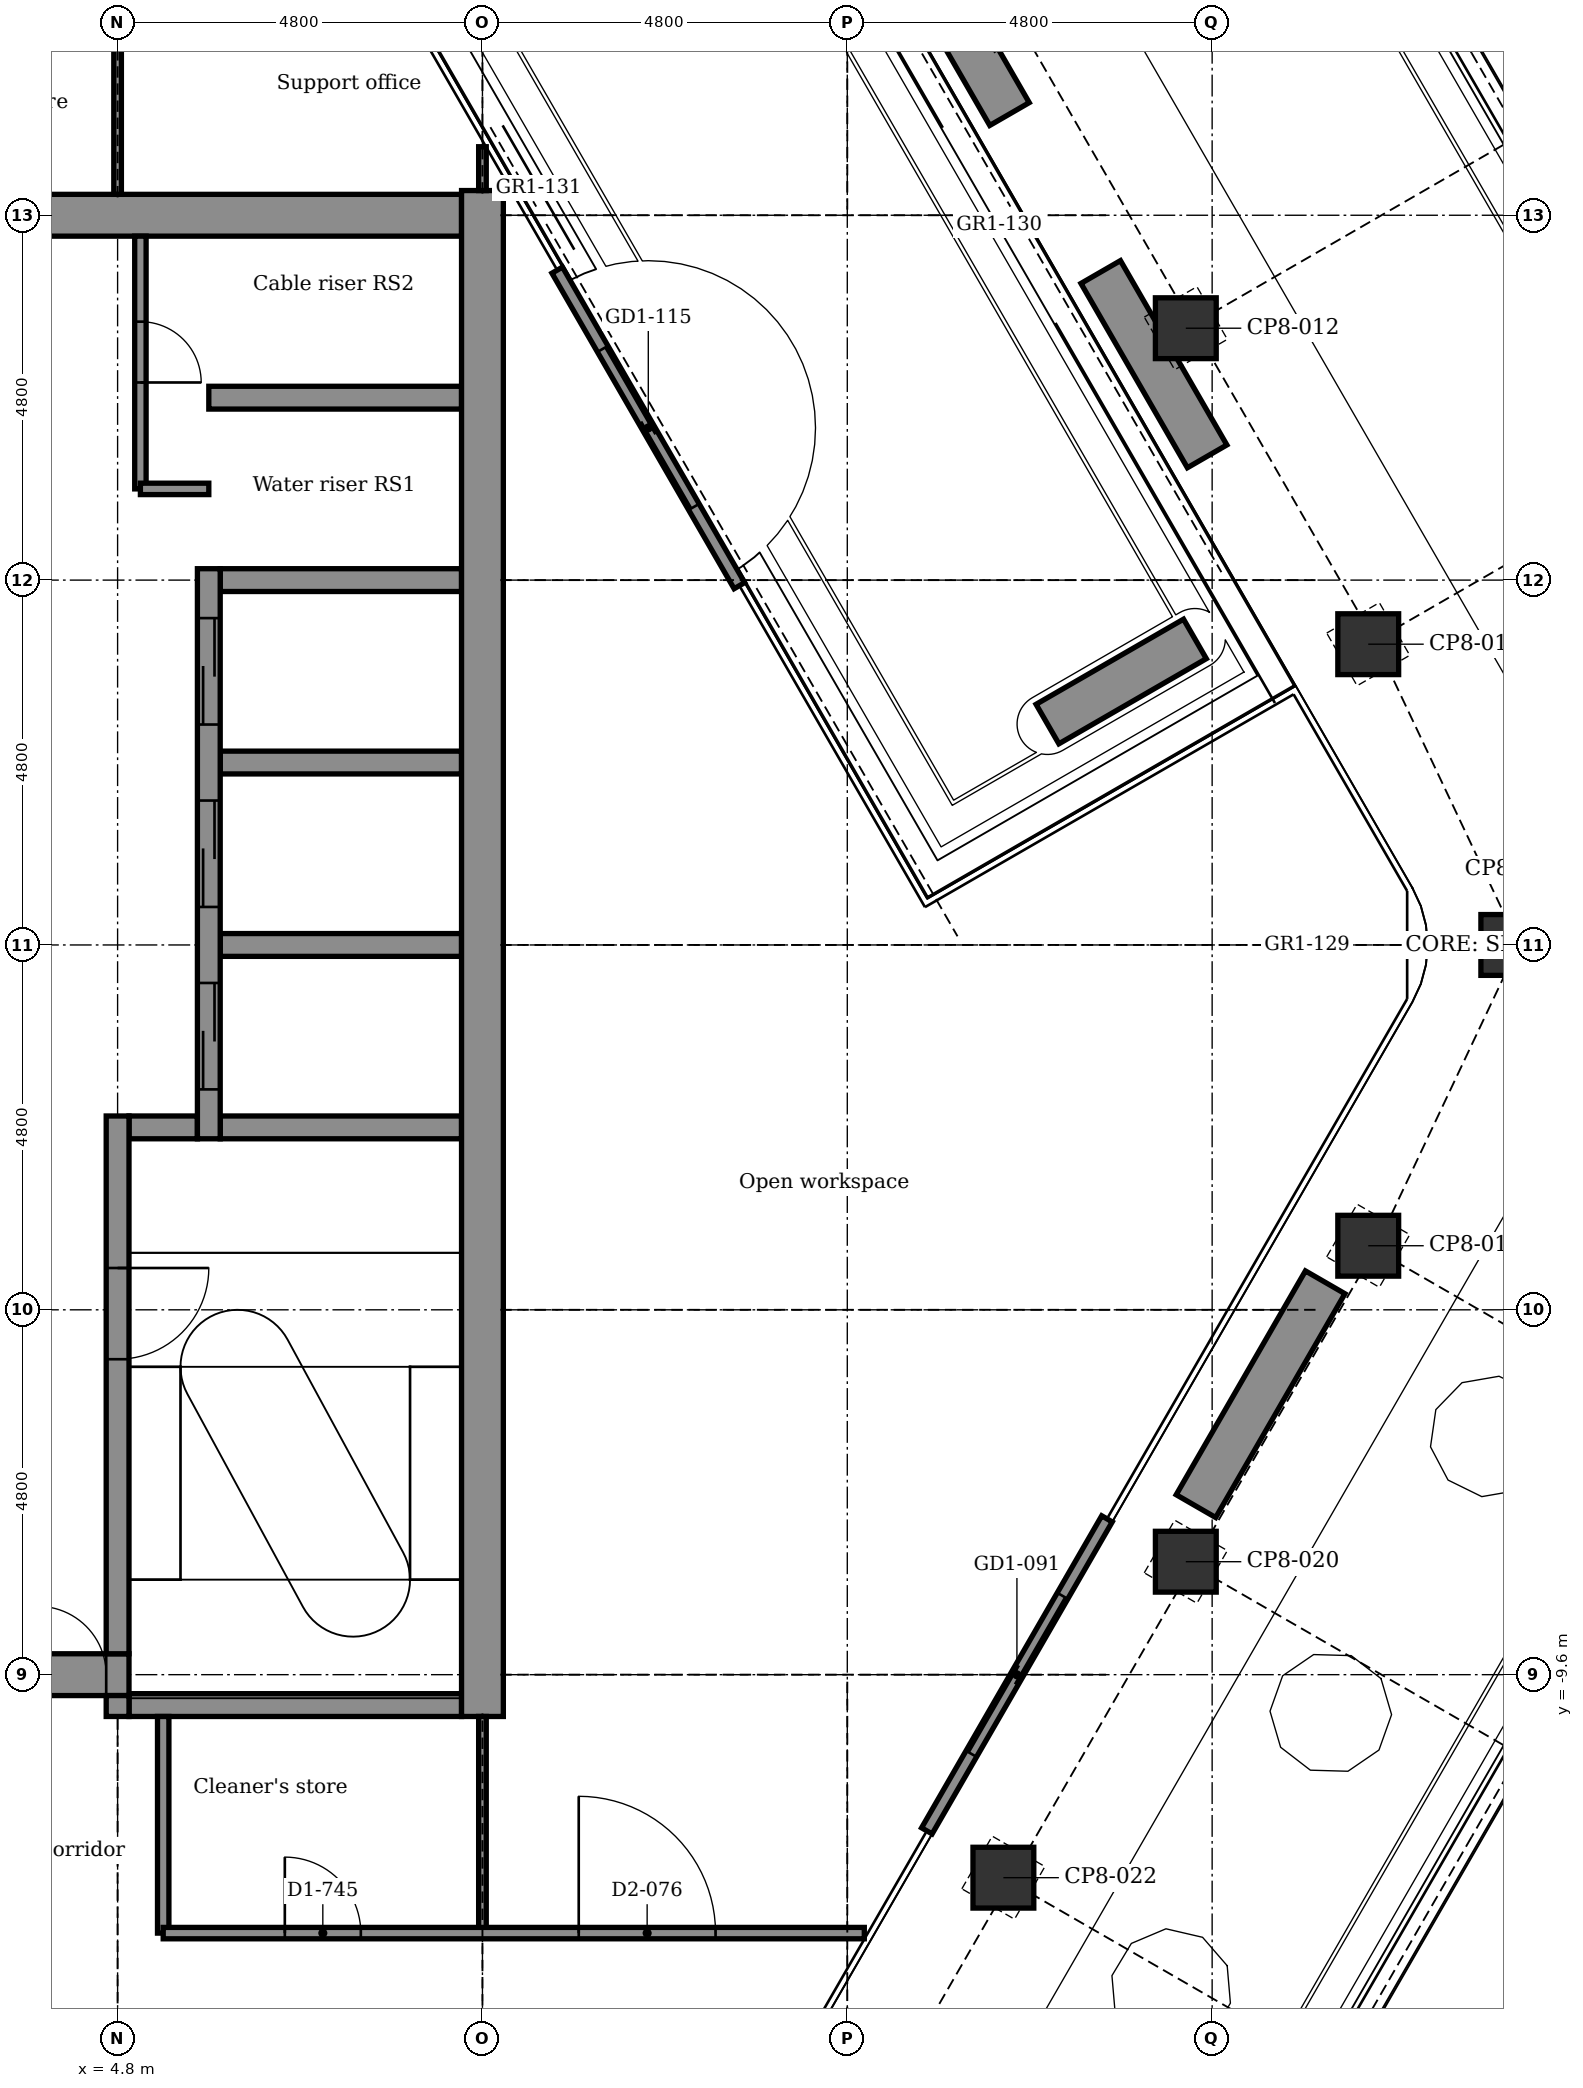
"""IFC4 building model, lengths in metres.
Left out: names, types, materials, properties, quantities, classifications, styles, units other than length and angle.
Written with IfcOpenShell. Run it as: python <this file> out.ifc"""

import sys

from ifc_helpers import new_model, si_unit, direction, frame, frame_2d, origin, origin_2d, place, context, subcontext, project, spatial, rectangle, extrude, element, fill, save


model = new_model("IFC4")
c1 = context("Model", 3, precision=1e-05, world=origin(), true_north=direction((0.0, 1.0)))
c2 = subcontext(c1, "Body", "Model", "MODEL_VIEW")
j1 = project(units=[si_unit("LENGTHUNIT", "METRE"), si_unit("PLANEANGLEUNIT", "RADIAN")], contexts=[c1])
p1 = place(None, origin())
s1 = spatial("IfcSite", under=j1, at=p1, CompositionType="ELEMENT")
p2 = place(p1, origin())
s2 = spatial("IfcBuilding", under=s1, at=p2, CompositionType="ELEMENT")
p3 = place(p2, frame((0.0, 0.0, 285.2)))
s3 = spatial("IfcBuildingStorey", under=s2, at=p3, CompositionType="ELEMENT", Elevation=285.2)
for number, where, z_axis, x_axis in (
    (1, (16.454, 12.271, -0.15), (0.0, 0.0, 1.0), (0.866, 0.5, 0.0)),
    (2, (18.854, 8.114, -0.15), (0.0, 0.0, 1.0), (0.866, 0.5, 0.0)),
    (3, (21.254, 3.957, -0.15), (0.0, 0.0, 1.0), (0.866, 0.5, 0.0)),
    (4, (23.136, 0.0, -0.15), (0.0, 0.0, 1.0), (1.0, 0.0, 0.0)),
    (5, (21.254, -3.957, -0.15), (0.0, 0.0, 1.0), (0.5, 0.866, 0.0)),
    (6, (18.854, -8.114, -0.15), (0.0, 0.0, 1.0), (0.5, 0.866, 0.0)),
    (7, (16.454, -12.271, -0.15), (0.0, 0.0, 1.0), (0.5, 0.866, 0.0)),
):
    element("IfcColumn", number, at=place(p3, frame(where, z_axis=z_axis, x_axis=x_axis)), inside=s3, PredefinedType="COLUMN", context=c2, shape_type="SweptSolid", body=[
        extrude(rectangle(XDim=0.8, YDim=0.8, at=origin_2d()), origin(), (0.0, 0.0, 1.0), 3.9),
    ])
p4 = place(p3, frame((4.95, -10.0, -0.15), z_axis=(0.0, 0.0, 1.0), x_axis=(1.0, 0.0, 0.0)))
e8 = element("IfcWall", 8, at=p4, inside=s3, PredefinedType="STANDARD", context=c2, shape_type="SweptSolid", body=[
    extrude(rectangle(XDim=4.375, YDim=0.3, at=frame_2d((2.188, 0.0))), origin(), (0.0, 0.0, 1.0), 3.9),
])
p5 = place(p3, frame((-5.25, -9.6, -0.15), z_axis=(0.0, 0.0, 1.0), x_axis=(1.0, 0.0, 0.0)))
e9 = element("IfcWall", 9, at=p5, inside=s3, PredefinedType="SHEAR", context=c2, shape_type="SweptSolid", body=[
    extrude(rectangle(XDim=10.2, YDim=0.55, at=frame_2d((5.1, 0.0))), origin(), (0.0, 0.0, 1.0), 3.9),
])
p6 = place(p5, frame((9.0, 0.0, 0.15)))
e10 = element("IfcOpeningElement", 10, at=p6, cuts=e9, PredefinedType="OPENING", context=c2, shape_type="SweptSolid", body=[
    extrude(rectangle(XDim=0.9, YDim=2.1, at=frame_2d((0.45, 1.05))), frame((0.0, 0.285, 0.0), z_axis=(0.0, -1.0, 0.0), x_axis=(1.0, 0.0, 0.0)), (0.0, 0.0, 1.0), 0.57),
])
p7 = place(p3, frame((4.95, -2.4, -0.15), z_axis=(0.0, 0.0, 1.0), x_axis=(1.0, 0.0, 0.0)))
e11 = element("IfcWall", 11, at=p7, inside=s3, PredefinedType="STANDARD", context=c2, shape_type="SweptSolid", body=[
    extrude(rectangle(XDim=0.9, YDim=0.3, at=frame_2d((0.45, 0.0))), origin(), (0.0, 0.0, 1.0), 3.9),
])
for number, where, z_axis, x_axis in (
    (12, (6.15, -2.4, -0.15), (0.0, 0.0, 1.0), (1.0, 0.0, 0.0)),
    (13, (6.15, 0.0, -0.15), (0.0, 0.0, 1.0), (1.0, 0.0, 0.0)),
    (14, (6.15, 2.4, -0.15), (0.0, 0.0, 1.0), (1.0, 0.0, 0.0)),
    (15, (6.15, 4.8, -0.15), (0.0, 0.0, 1.0), (1.0, 0.0, 0.0)),
):
    element("IfcWall", number, at=place(p3, frame(where, z_axis=z_axis, x_axis=x_axis)), inside=s3, PredefinedType="STANDARD", context=c2, shape_type="SweptSolid", body=[
        extrude(rectangle(XDim=3.175, YDim=0.3, at=frame_2d((1.587, 0.0))), origin(), (0.0, 0.0, 1.0), 3.9),
    ])
p8 = place(p3, frame((6.0, 7.2, -0.15), z_axis=(0.0, 0.0, 1.0), x_axis=(1.0, 0.0, 0.0)))
e16 = element("IfcWall", 16, at=p8, inside=s3, PredefinedType="STANDARD", context=c2, shape_type="SweptSolid", body=[
    extrude(rectangle(XDim=3.325, YDim=0.3, at=frame_2d((1.663, 0.0))), origin(), (0.0, 0.0, 1.0), 3.9),
])
p9 = place(p3, frame((-5.25, 9.6, -0.15), z_axis=(0.0, 0.0, 1.0), x_axis=(1.0, 0.0, 0.0)))
e17 = element("IfcWall", 17, at=p9, inside=s3, PredefinedType="SHEAR", context=c2, shape_type="SweptSolid", body=[
    extrude(rectangle(XDim=14.575, YDim=0.55, at=frame_2d((7.288, 0.0))), origin(), (0.0, 0.0, 1.0), 3.9),
])
p10 = place(p9, frame((0.6, 0.0, 0.15)))
e18 = element("IfcOpeningElement", 18, at=p10, cuts=e17, PredefinedType="OPENING", context=c2, shape_type="SweptSolid", body=[
    extrude(rectangle(XDim=0.9, YDim=2.1, at=frame_2d((0.45, 1.05))), frame((0.0, 0.285, 0.0), z_axis=(0.0, -1.0, 0.0), x_axis=(1.0, 0.0, 0.0)), (0.0, 0.0, 1.0), 0.57),
])
p11 = place(p3, frame((4.8, -10.15, -0.15), z_axis=(0.0, 0.0, 1.0), x_axis=(0.0, 1.0, 0.0)))
e19 = element("IfcWall", 19, at=p11, inside=s3, PredefinedType="STANDARD", context=c2, shape_type="SweptSolid", body=[
    extrude(rectangle(XDim=0.275, YDim=0.3, at=frame_2d((0.137, 0.0))), origin(), (0.0, 0.0, 1.0), 3.9),
])
p12 = place(p3, frame((4.8, -9.325, -0.15), z_axis=(0.0, 0.0, 1.0), x_axis=(0.0, 1.0, 0.0)))
e20 = element("IfcWall", 20, at=p12, inside=s3, PredefinedType="STANDARD", context=c2, shape_type="SweptSolid", body=[
    extrude(rectangle(XDim=7.075, YDim=0.3, at=frame_2d((3.538, 0.0))), origin(), (0.0, 0.0, 1.0), 3.9),
])
p13 = place(p12, frame((3.875, 0.0, 0.15)))
e21 = element("IfcOpeningElement", 21, at=p13, cuts=e20, PredefinedType="OPENING", context=c2, shape_type="SweptSolid", body=[
    extrude(rectangle(XDim=1.2, YDim=2.1, at=frame_2d((0.6, 1.05))), frame((0.0, 0.16, 0.0), z_axis=(0.0, -1.0, 0.0), x_axis=(1.0, 0.0, 0.0)), (0.0, 0.0, 1.0), 0.32),
])
p14 = place(p3, frame((6.0, -2.55, -0.15), z_axis=(0.0, 0.0, 1.0), x_axis=(0.0, 1.0, 0.0)))
e22 = element("IfcWall", 22, at=p14, inside=s3, PredefinedType="STANDARD", context=c2, shape_type="SweptSolid", body=[
    extrude(rectangle(XDim=7.5, YDim=0.3, at=frame_2d((3.75, 0.0))), origin(), (0.0, 0.0, 1.0), 3.9),
])
p15 = place(p14, frame((0.65, 0.0, 0.15)))
e23 = element("IfcOpeningElement", 23, at=p15, cuts=e22, PredefinedType="OPENING", context=c2, shape_type="SweptSolid", body=[
    extrude(rectangle(XDim=1.4, YDim=2.1, at=frame_2d((0.7, 1.05))), frame((0.0, 0.16, 0.0), z_axis=(0.0, -1.0, 0.0), x_axis=(1.0, 0.0, 0.0)), (0.0, 0.0, 1.0), 0.32),
])
p16 = place(p14, frame((3.05, 0.0, 0.15)))
e24 = element("IfcOpeningElement", 24, at=p16, cuts=e22, PredefinedType="OPENING", context=c2, shape_type="SweptSolid", body=[
    extrude(rectangle(XDim=1.4, YDim=2.1, at=frame_2d((0.7, 1.05))), frame((0.0, 0.16, 0.0), z_axis=(0.0, -1.0, 0.0), x_axis=(1.0, 0.0, 0.0)), (0.0, 0.0, 1.0), 0.32),
])
p17 = place(p14, frame((5.45, 0.0, 0.15)))
e25 = element("IfcOpeningElement", 25, at=p17, cuts=e22, PredefinedType="OPENING", context=c2, shape_type="SweptSolid", body=[
    extrude(rectangle(XDim=1.4, YDim=2.1, at=frame_2d((0.7, 1.05))), frame((0.0, 0.16, 0.0), z_axis=(0.0, -1.0, 0.0), x_axis=(1.0, 0.0, 0.0)), (0.0, 0.0, 1.0), 0.32),
])
p18 = place(p3, frame((9.6, -10.15, -0.15), z_axis=(0.0, 0.0, 1.0), x_axis=(0.0, 1.0, 0.0)))
e26 = element("IfcWall", 26, at=p18, inside=s3, PredefinedType="SHEAR", context=c2, shape_type="SweptSolid", body=[
    extrude(rectangle(XDim=20.075, YDim=0.55, at=frame_2d((10.038, 0.0))), origin(), (0.0, 0.0, 1.0), 3.9),
])
p19 = place(p3, frame((10.583, 8.878, 0.0), z_axis=(0.0, 0.0, 1.0), x_axis=(0.500011970786, -0.866018492338, 0.0)))
e27 = element("IfcWall", 27, at=p19, inside=s3, PredefinedType="PARTITIONING", context=c2, shape_type="SweptSolid", body=[
    extrude(rectangle(XDim=4.793, YDim=0.16, at=frame_2d((2.397, 0.0))), origin(), (0.0, 0.0, 1.0), 3.75),
])
p20 = place(p19, frame((1.197, 0.0, 0.0)))
e28 = element("IfcOpeningElement", 28, at=p20, cuts=e27, PredefinedType="OPENING", context=c2, shape_type="SweptSolid", body=[
    extrude(rectangle(XDim=2.4, YDim=2.4, at=frame_2d((1.2, 1.2))), frame((0.0, 0.09, 0.0), z_axis=(0.0, -1.0, 0.0), x_axis=(1.0, 0.0, 0.0)), (0.0, 0.0, 1.0), 0.18),
])
p21 = place(p3, frame((17.817, -7.55, 0.0), z_axis=(0.0, 0.0, 1.0), x_axis=(-0.499978080042, -0.866038058908, 0.0)))
e29 = element("IfcWall", 29, at=p21, inside=s3, PredefinedType="PARTITIONING", context=c2, shape_type="SweptSolid", body=[
    extrude(rectangle(XDim=4.74, YDim=0.16, at=frame_2d((2.37, 0.0))), origin(), (0.0, 0.0, 1.0), 3.75),
])
p22 = place(p21, frame((1.17, 0.0, 0.0)))
e30 = element("IfcOpeningElement", 30, at=p22, cuts=e29, PredefinedType="OPENING", context=c2, shape_type="SweptSolid", body=[
    extrude(rectangle(XDim=2.4, YDim=2.4, at=frame_2d((1.2, 1.2))), frame((0.0, 0.09, 0.0), z_axis=(0.0, -1.0, 0.0), x_axis=(1.0, 0.0, 0.0)), (0.0, 0.0, 1.0), 0.18),
])
p23 = place(p3, frame((20.687, -4.438, 0.0), z_axis=(0.0, 0.0, 1.0), x_axis=(-0.500008388397, -0.866020560687, 0.0)))
e31 = element("IfcWall", 31, at=p23, inside=s3, PredefinedType="USERDEFINED", context=c2, shape_type="SweptSolid", body=[
    extrude(rectangle(XDim=3.4, YDim=0.6, at=frame_2d((1.7, 0.0))), origin(), (0.0, 0.0, 1.0), 0.7),
])
p24 = place(p3, frame((17.034, 2.906, 0.0), z_axis=(0.0, 0.0, 1.0), x_axis=(0.866027664105, 0.49999608499, 0.0)))
e32 = element("IfcWall", 32, at=p24, inside=s3, PredefinedType="USERDEFINED", context=c2, shape_type="SweptSolid", body=[
    extrude(rectangle(XDim=2.24, YDim=0.6, at=frame_2d((1.12, 0.0))), origin(), (0.0, 0.0, 1.0), 0.7),
])
p25 = place(p3, frame((16.534, 10.932, 0.0), z_axis=(0.0, 0.0, 1.0), x_axis=(-0.49998411664, 0.866034573852, 0.0)))
e33 = element("IfcWall", 33, at=p25, inside=s3, PredefinedType="USERDEFINED", context=c2, shape_type="SweptSolid", body=[
    extrude(rectangle(XDim=2.8, YDim=0.6, at=frame_2d((1.4, 0.0))), origin(), (0.0, 0.0, 1.0), 0.7),
])
p26 = place(p3, frame((17.734, 8.853, 0.0), z_axis=(0.0, 0.0, 1.0), x_axis=(0.500049511043, -0.865996816683, 0.0)))
e34 = element("IfcWall", 34, at=p26, inside=s3, PredefinedType="USERDEFINED", context=c2, shape_type="SweptSolid", body=[
    extrude(rectangle(XDim=2.8, YDim=0.6, at=frame_2d((1.4, 0.0))), origin(), (0.0, 0.0, 1.0), 0.7),
])
p27 = place(p3, frame((9.6, -13.0, 0.0), z_axis=(0.0, 0.0, 1.0), x_axis=(0.0, 1.0, 0.0)))
e35 = element("IfcWall", 35, at=p27, inside=s3, PredefinedType="PARTITIONING", context=c2, shape_type="SweptSolid", body=[
    extrude(rectangle(XDim=2.85, YDim=0.1, at=frame_2d((1.425, 0.0))), origin(), (0.0, 0.0, 1.0), 3.293),
])
p28 = place(p3, frame((9.6, 9.925, 0.0), z_axis=(0.0, 0.0, 1.0), x_axis=(0.0, 1.0, 0.0)))
e36 = element("IfcWall", 36, at=p28, inside=s3, PredefinedType="PARTITIONING", context=c2, shape_type="SweptSolid", body=[
    extrude(rectangle(XDim=0.576, YDim=0.1, at=frame_2d((0.288, 0.0))), origin(), (0.0, 0.0, 1.0), 3.217),
])
p29 = place(p3, frame((5.4, -13.0, 0.0), z_axis=(0.0, 0.0, 1.0), x_axis=(0.0, 1.0, 0.0)))
e37 = element("IfcWall", 37, at=p29, inside=s3, PredefinedType="PARTITIONING", context=c2, shape_type="SweptSolid", body=[
    extrude(rectangle(XDim=2.85, YDim=0.15, at=frame_2d((1.425, 0.0))), origin(), (0.0, 0.0, 1.0), 3.75),
])
p30 = place(p3, frame((5.1, 6.0, 0.0), z_axis=(0.0, 0.0, 1.0), x_axis=(0.0, 1.0, 0.0)))
e38 = element("IfcWall", 38, at=p30, inside=s3, PredefinedType="PARTITIONING", context=c2, shape_type="SweptSolid", body=[
    extrude(rectangle(XDim=3.325, YDim=0.15, at=frame_2d((1.663, 0.0))), origin(), (0.0, 0.0, 1.0), 3.75),
])
p31 = place(p30, frame((1.4, 0.0, 0.0)))
e39 = element("IfcOpeningElement", 39, at=p31, cuts=e38, PredefinedType="OPENING", context=c2, shape_type="SweptSolid", body=[
    extrude(rectangle(XDim=0.8, YDim=2.1, at=frame_2d((0.4, 1.05))), frame((0.0, 0.085, 0.0), z_axis=(0.0, -1.0, 0.0), x_axis=(1.0, 0.0, 0.0)), (0.0, 0.0, 1.0), 0.17),
])
p32 = place(p3, frame((4.8, 9.875, 0.0), z_axis=(0.0, 0.0, 1.0), x_axis=(0.0, 1.0, 0.0)))
e40 = element("IfcWall", 40, at=p32, inside=s3, PredefinedType="PARTITIONING", context=c2, shape_type="SweptSolid", body=[
    extrude(rectangle(XDim=3.125, YDim=0.1, at=frame_2d((1.562, 0.0))), origin(), (0.0, 0.0, 1.0), 3.217),
])
p33 = place(p3, frame((5.4, -13.0, 0.0), z_axis=(0.0, 0.0, 1.0), x_axis=(1.0, 0.0, 0.0)))
e41 = element("IfcWall", 41, at=p33, inside=s3, PredefinedType="PARTITIONING", context=c2, shape_type="SweptSolid", body=[
    extrude(rectangle(XDim=9.224, YDim=0.15, at=frame_2d((4.612, 0.0))), origin(), (0.0, 0.0, 1.0), 3.75),
])
p34 = place(p33, frame((1.6, 0.0, 0.0)))
e42 = element("IfcOpeningElement", 42, at=p34, cuts=e41, PredefinedType="OPENING", context=c2, shape_type="SweptSolid", body=[
    extrude(rectangle(XDim=1.0, YDim=2.1, at=frame_2d((0.5, 1.05))), frame((0.0, 0.085, 0.0), z_axis=(0.0, -1.0, 0.0), x_axis=(1.0, 0.0, 0.0)), (0.0, 0.0, 1.0), 0.17),
])
p35 = place(p33, frame((5.467, 0.0, 0.0)))
e43 = element("IfcOpeningElement", 43, at=p35, cuts=e41, PredefinedType="OPENING", context=c2, shape_type="SweptSolid", body=[
    extrude(rectangle(XDim=1.8, YDim=2.1, at=frame_2d((0.9, 1.05))), frame((0.0, 0.085, 0.0), z_axis=(0.0, -1.0, 0.0), x_axis=(1.0, 0.0, 0.0)), (0.0, 0.0, 1.0), 0.17),
])
p36 = place(p3, frame((5.1, 6.0, 0.0), z_axis=(0.0, 0.0, 1.0), x_axis=(1.0, 0.0, 0.0)))
e44 = element("IfcWall", 44, at=p36, inside=s3, PredefinedType="PARTITIONING", context=c2, shape_type="SweptSolid", body=[
    extrude(rectangle(XDim=0.9, YDim=0.15, at=frame_2d((0.45, 0.0))), origin(), (0.0, 0.0, 1.0), 3.75),
])
p37 = place(p20, origin())
e45 = element("IfcDoor", 45, at=p37, inside=s3, OperationType="DOUBLE_DOOR_SLIDING", PredefinedType="DOOR", context=c2, shape_type="SweptSolid", body=[
    extrude(rectangle(XDim=2.4, YDim=2.4, at=frame_2d((1.2, 1.2))), frame((0.0, 0.025, 0.0), z_axis=(0.0, -1.0, 0.0), x_axis=(1.0, 0.0, 0.0)), (0.0, 0.0, 1.0), 0.05),
])
fill(e28, e45)
p38 = place(p22, origin())
e46 = element("IfcDoor", 46, at=p38, inside=s3, OperationType="DOUBLE_DOOR_SLIDING", PredefinedType="DOOR", context=c2, shape_type="SweptSolid", body=[
    extrude(rectangle(XDim=2.4, YDim=2.4, at=frame_2d((1.2, 1.2))), frame((0.0, 0.025, 0.0), z_axis=(0.0, -1.0, 0.0), x_axis=(1.0, 0.0, 0.0)), (0.0, 0.0, 1.0), 0.05),
])
fill(e30, e46)
p39 = place(p31, frame((0.8, 0.0, 0.0), z_axis=(0.0, 0.0, 1.0), x_axis=(-1.0, 0.0, 0.0)))
e47 = element("IfcDoor", 47, at=p39, inside=s3, OperationType="SINGLE_SWING_LEFT", PredefinedType="DOOR", context=c2, shape_type="SweptSolid", body=[
    extrude(rectangle(XDim=0.8, YDim=2.1, at=frame_2d((0.4, 1.05))), frame((0.0, 0.025, 0.0), z_axis=(0.0, -1.0, 0.0), x_axis=(1.0, 0.0, 0.0)), (0.0, 0.0, 1.0), 0.05),
])
fill(e39, e47)
p40 = place(p34, origin())
e48 = element("IfcDoor", 48, at=p40, inside=s3, OperationType="SINGLE_SWING_LEFT", PredefinedType="DOOR", context=c2, shape_type="SweptSolid", body=[
    extrude(rectangle(XDim=1.0, YDim=2.1, at=frame_2d((0.5, 1.05))), frame((0.0, 0.025, 0.0), z_axis=(0.0, -1.0, 0.0), x_axis=(1.0, 0.0, 0.0)), (0.0, 0.0, 1.0), 0.05),
])
fill(e42, e48)
p41 = place(p35, origin())
e49 = element("IfcDoor", 49, at=p41, inside=s3, OperationType="SINGLE_SWING_LEFT", PredefinedType="DOOR", context=c2, shape_type="SweptSolid", body=[
    extrude(rectangle(XDim=1.8, YDim=2.1, at=frame_2d((0.9, 1.05))), frame((0.0, 0.025, 0.0), z_axis=(0.0, -1.0, 0.0), x_axis=(1.0, 0.0, 0.0)), (0.0, 0.0, 1.0), 0.05),
])
fill(e43, e49)
p42 = place(p15, origin())
e50 = element("IfcDoor", 50, at=p42, inside=s3, OperationType="DOUBLE_DOOR_SLIDING", PredefinedType="DOOR", context=c2, shape_type="SweptSolid", body=[
    extrude(rectangle(XDim=1.4, YDim=2.1, at=frame_2d((0.7, 1.05))), frame((0.0, 0.025, 0.0), z_axis=(0.0, -1.0, 0.0), x_axis=(1.0, 0.0, 0.0)), (0.0, 0.0, 1.0), 0.05),
])
fill(e23, e50)
p43 = place(p16, origin())
e51 = element("IfcDoor", 51, at=p43, inside=s3, OperationType="DOUBLE_DOOR_SLIDING", PredefinedType="DOOR", context=c2, shape_type="SweptSolid", body=[
    extrude(rectangle(XDim=1.4, YDim=2.1, at=frame_2d((0.7, 1.05))), frame((0.0, 0.025, 0.0), z_axis=(0.0, -1.0, 0.0), x_axis=(1.0, 0.0, 0.0)), (0.0, 0.0, 1.0), 0.05),
])
fill(e24, e51)
p44 = place(p17, origin())
e52 = element("IfcDoor", 52, at=p44, inside=s3, OperationType="DOUBLE_DOOR_SLIDING", PredefinedType="DOOR", context=c2, shape_type="SweptSolid", body=[
    extrude(rectangle(XDim=1.4, YDim=2.1, at=frame_2d((0.7, 1.05))), frame((0.0, 0.025, 0.0), z_axis=(0.0, -1.0, 0.0), x_axis=(1.0, 0.0, 0.0)), (0.0, 0.0, 1.0), 0.05),
])
fill(e25, e52)
p45 = place(p13, frame((1.2, 0.0, 0.0), z_axis=(0.0, 0.0, 1.0), x_axis=(-1.0, 0.0, 0.0)))
e53 = element("IfcDoor", 53, at=p45, inside=s3, OperationType="SINGLE_SWING_RIGHT", PredefinedType="DOOR", context=c2, shape_type="SweptSolid", body=[
    extrude(rectangle(XDim=1.2, YDim=2.1, at=frame_2d((0.6, 1.05))), frame((0.0, 0.025, 0.0), z_axis=(0.0, -1.0, 0.0), x_axis=(1.0, 0.0, 0.0)), (0.0, 0.0, 1.0), 0.05),
])
fill(e21, e53)
p46 = place(p6, origin())
e54 = element("IfcDoor", 54, at=p46, inside=s3, OperationType="SINGLE_SWING_LEFT", PredefinedType="DOOR", context=c2, shape_type="SweptSolid", body=[
    extrude(rectangle(XDim=0.9, YDim=2.1, at=frame_2d((0.45, 1.05))), frame((0.0, 0.025, 0.0), z_axis=(0.0, -1.0, 0.0), x_axis=(1.0, 0.0, 0.0)), (0.0, 0.0, 1.0), 0.05),
])
fill(e10, e54)
save(model, sys.argv[1])
